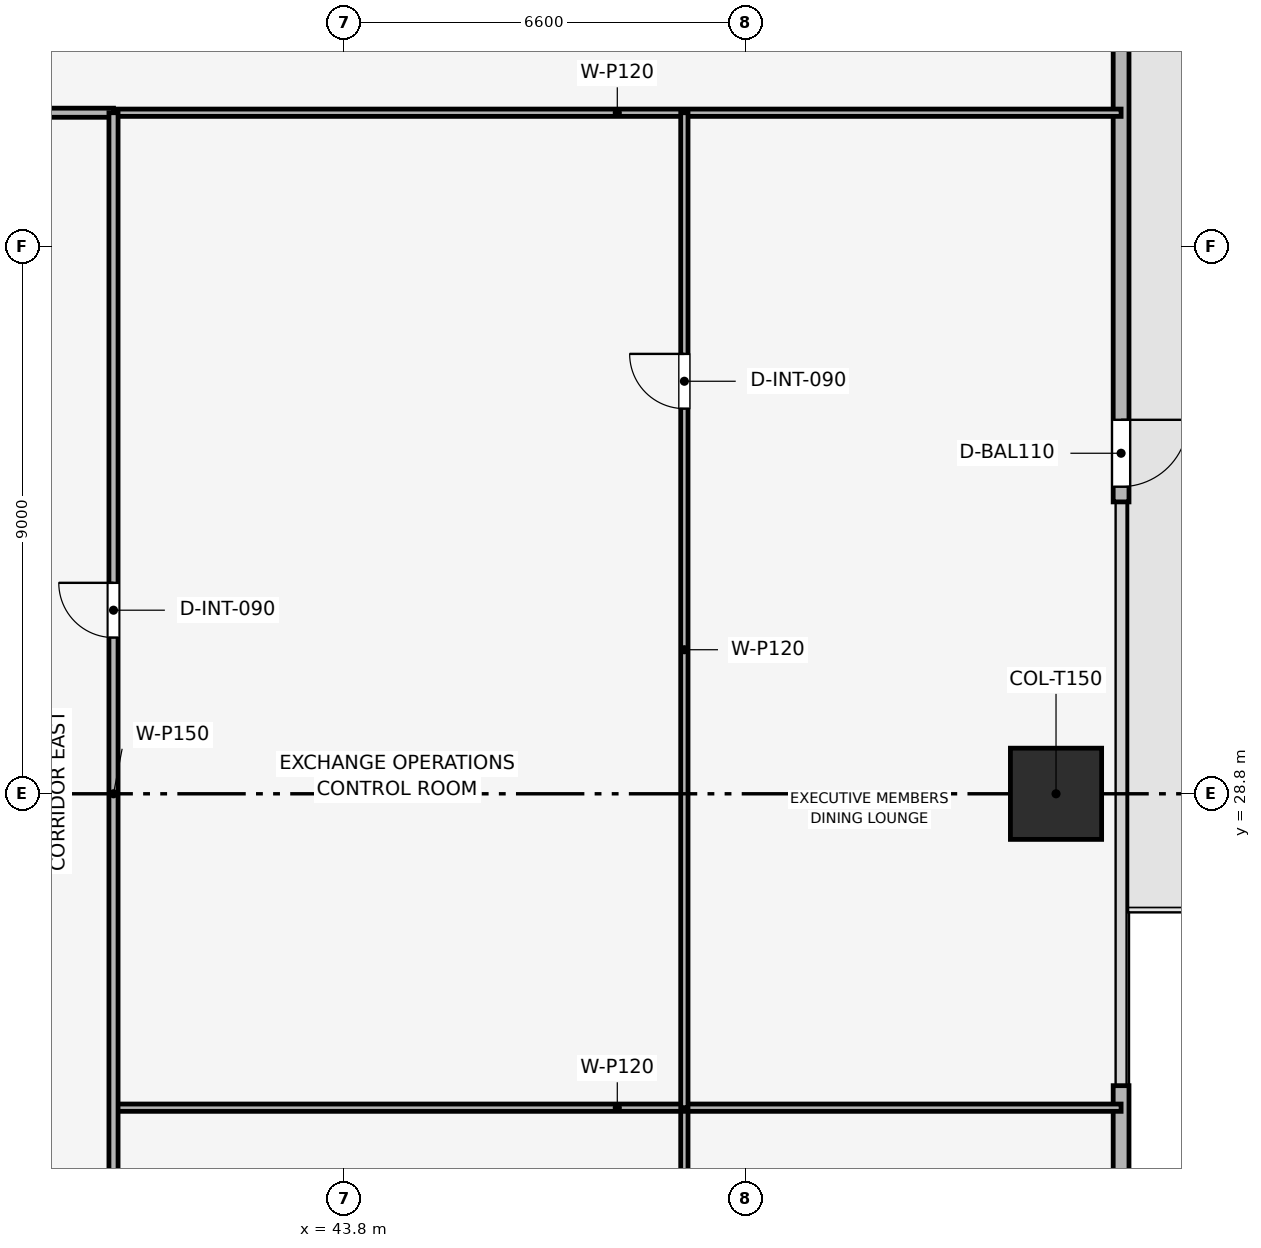
"""IFC4 building model, lengths in metres.
Left out: names, types, materials, properties, quantities, classifications, styles, units other than length and angle.
Written with IfcOpenShell. Run it as: python <this file> out.ifc"""

import sys

from ifc_helpers import new_model, si_unit, direction, frame, frame_2d, origin, origin_2d, place, context, subcontext, project, spatial, rectangle, extrude, element, fill, save


model = new_model("IFC4")
c1 = context("Model", 3, precision=1e-05, world=origin(), true_north=direction((0.0, 1.0)))
c2 = subcontext(c1, "Body", "Model", "MODEL_VIEW")
j1 = project(units=[si_unit("LENGTHUNIT", "METRE"), si_unit("PLANEANGLEUNIT", "RADIAN")], contexts=[c1])
p1 = place(None, origin())
s1 = spatial("IfcSite", under=j1, at=p1, CompositionType="ELEMENT")
p2 = place(p1, origin())
s2 = spatial("IfcBuilding", under=s1, at=p2, CompositionType="ELEMENT")
p3 = place(p2, frame((0.0, 0.0, 96.3)))
s3 = spatial("IfcBuildingStorey", under=s2, at=p3, CompositionType="ELEMENT", Elevation=96.3)
p4 = place(p3, frame((55.5, 28.8, 0.003), z_axis=(0.0, 0.0, 1.0), x_axis=(1.0, 0.0, 0.0)))
e1 = element("IfcColumn", 1, at=p4, inside=s3, PredefinedType="COLUMN", context=c2, shape_type="SweptSolid", body=[
    extrude(rectangle(XDim=1.5, YDim=1.5, at=origin_2d()), origin(), (0.0, 0.0, 1.0), 3.644),
])
p5 = place(p3, frame((56.57, 48.9, 0.0), z_axis=(0.0, 0.0, 1.0), x_axis=(0.0, -1.0, 0.0)))
e2 = element("IfcWall", 2, at=p5, inside=s3, PredefinedType="SOLIDWALL", context=c2, shape_type="SweptSolid", body=[
    extrude(rectangle(XDim=15.3, YDim=0.26, at=frame_2d((7.65, 0.0))), origin(), (0.0, 0.0, 1.0), 3.65),
])
p6 = place(p5, frame((13.95, 0.0, 0.0)))
e3 = element("IfcOpeningElement", 3, at=p6, cuts=e2, PredefinedType="OPENING", context=c2, shape_type="SweptSolid", body=[
    extrude(rectangle(XDim=1.1, YDim=2.2, at=frame_2d((0.55, 1.1))), frame((0.0, 0.14, 0.0), z_axis=(0.0, -1.0, 0.0), x_axis=(1.0, 0.0, 0.0)), (0.0, 0.0, 1.0), 0.28),
])
p7 = place(p3, frame((56.57, 24.0, 0.0), z_axis=(0.0, 0.0, 1.0), x_axis=(0.0, -1.0, 0.0)))
e4 = element("IfcWall", 4, at=p7, inside=s3, PredefinedType="SOLIDWALL", context=c2, shape_type="SweptSolid", body=[
    extrude(rectangle(XDim=15.3, YDim=0.26, at=frame_2d((7.65, 0.0))), origin(), (0.0, 0.0, 1.0), 3.65),
])
p8 = place(p7, frame((11.25, 0.0, 0.9)))
e5 = element("IfcOpeningElement", 5, at=p8, cuts=e4, PredefinedType="OPENING", context=c2, shape_type="SweptSolid", body=[
    extrude(rectangle(XDim=3.8, YDim=1.9, at=frame_2d((1.9, 0.95))), frame((0.0, 0.14, 0.0), z_axis=(0.0, -1.0, 0.0), x_axis=(1.0, 0.0, 0.0)), (0.0, 0.0, 1.0), 0.28),
])
p9 = place(p3, frame((40.0, 40.0, 0.0), z_axis=(0.0, 0.0, 1.0), x_axis=(1.0, 0.0, 0.0)))
e6 = element("IfcWall", 6, at=p9, inside=s3, PredefinedType="PARTITIONING", context=c2, shape_type="SweptSolid", body=[
    extrude(rectangle(XDim=16.57, YDim=0.12, at=frame_2d((8.285, 0.0))), origin(), (0.0, 0.0, 1.0), 2.935),
])
p10 = place(p3, frame((49.388, 17.6, 0.0), z_axis=(0.0, 0.0, 1.0), x_axis=(0.0, 1.0, 0.0)))
e7 = element("IfcWall", 7, at=p10, inside=s3, PredefinedType="PARTITIONING", context=c2, shape_type="SweptSolid", body=[
    extrude(rectangle(XDim=6.038, YDim=0.12, at=frame_2d((3.019, 0.0))), origin(), (0.0, 0.0, 1.0), 3.085),
])
p11 = place(p10, frame((3.753, 0.0, 0.0)))
e8 = element("IfcOpeningElement", 8, at=p11, cuts=e7, PredefinedType="OPENING", context=c2, shape_type="SweptSolid", body=[
    extrude(rectangle(XDim=0.9, YDim=2.1, at=frame_2d((0.45, 1.05))), frame((0.0, 0.07, 0.0), z_axis=(0.0, -1.0, 0.0), x_axis=(1.0, 0.0, 0.0)), (0.0, 0.0, 1.0), 0.14),
])
p12 = place(p3, frame((40.0, 23.638, 0.0), z_axis=(0.0, 0.0, 1.0), x_axis=(1.0, 0.0, 0.0)))
e9 = element("IfcWall", 9, at=p12, inside=s3, PredefinedType="PARTITIONING", context=c2, shape_type="SweptSolid", body=[
    extrude(rectangle(XDim=16.57, YDim=0.12, at=frame_2d((8.285, 0.0))), origin(), (0.0, 0.0, 1.0), 2.935),
])
p13 = place(p3, frame((49.388, 23.638, 0.0), z_axis=(0.0, 0.0, 1.0), x_axis=(0.0, 1.0, 0.0)))
e10 = element("IfcWall", 10, at=p13, inside=s3, PredefinedType="PARTITIONING", context=c2, shape_type="SweptSolid", body=[
    extrude(rectangle(XDim=16.362, YDim=0.12, at=frame_2d((8.181, 0.0))), origin(), (0.0, 0.0, 1.0), 3.085),
])
p14 = place(p13, frame((11.496, 0.0, 0.0)))
e11 = element("IfcOpeningElement", 11, at=p14, cuts=e10, PredefinedType="OPENING", context=c2, shape_type="SweptSolid", body=[
    extrude(rectangle(XDim=0.9, YDim=2.1, at=frame_2d((0.45, 1.05))), frame((0.0, 0.07, 0.0), z_axis=(0.0, -1.0, 0.0), x_axis=(1.0, 0.0, 0.0)), (0.0, 0.0, 1.0), 0.14),
])
p15 = place(p3, frame((17.6, 40.0, 0.0), z_axis=(0.0, 0.0, 1.0), x_axis=(1.0, 0.0, 0.0)))
e12 = element("IfcWall", 12, at=p15, inside=s3, PredefinedType="PARTITIONING", context=c2, shape_type="SweptSolid", body=[
    extrude(rectangle(XDim=22.4, YDim=0.15, at=frame_2d((11.2, 0.0))), origin(), (0.0, 0.0, 1.0), 3.085),
])
p16 = place(p15, frame((1.95, 0.0, 0.0)))
e13 = element("IfcOpeningElement", 13, at=p16, cuts=e12, PredefinedType="OPENING", context=c2, shape_type="SweptSolid", body=[
    extrude(rectangle(XDim=0.9, YDim=2.1, at=frame_2d((0.45, 1.05))), frame((0.0, 0.085, 0.0), z_axis=(0.0, -1.0, 0.0), x_axis=(1.0, 0.0, 0.0)), (0.0, 0.0, 1.0), 0.17),
])
p17 = place(p15, frame((5.75, 0.0, 0.0)))
e14 = element("IfcOpeningElement", 14, at=p17, cuts=e12, PredefinedType="OPENING", context=c2, shape_type="SweptSolid", body=[
    extrude(rectangle(XDim=0.9, YDim=2.1, at=frame_2d((0.45, 1.05))), frame((0.0, 0.085, 0.0), z_axis=(0.0, -1.0, 0.0), x_axis=(1.0, 0.0, 0.0)), (0.0, 0.0, 1.0), 0.17),
])
p18 = place(p15, frame((8.65, 0.0, 0.0)))
e15 = element("IfcOpeningElement", 15, at=p18, cuts=e12, PredefinedType="OPENING", context=c2, shape_type="SweptSolid", body=[
    extrude(rectangle(XDim=0.9, YDim=2.1, at=frame_2d((0.45, 1.05))), frame((0.0, 0.085, 0.0), z_axis=(0.0, -1.0, 0.0), x_axis=(1.0, 0.0, 0.0)), (0.0, 0.0, 1.0), 0.17),
])
p19 = place(p15, frame((11.4, 0.0, 0.0)))
e16 = element("IfcOpeningElement", 16, at=p19, cuts=e12, PredefinedType="OPENING", context=c2, shape_type="SweptSolid", body=[
    extrude(rectangle(XDim=0.95, YDim=2.1, at=frame_2d((0.475, 1.05))), frame((0.0, 0.085, 0.0), z_axis=(0.0, -1.0, 0.0), x_axis=(1.0, 0.0, 0.0)), (0.0, 0.0, 1.0), 0.17),
])
p20 = place(p15, frame((17.35, 0.0, 0.0)))
e17 = element("IfcOpeningElement", 17, at=p20, cuts=e12, PredefinedType="OPENING", context=c2, shape_type="SweptSolid", body=[
    extrude(rectangle(XDim=0.9, YDim=2.1, at=frame_2d((0.45, 1.05))), frame((0.0, 0.085, 0.0), z_axis=(0.0, -1.0, 0.0), x_axis=(1.0, 0.0, 0.0)), (0.0, 0.0, 1.0), 0.17),
])
p21 = place(p3, frame((40.0, 17.6, 0.0), z_axis=(0.0, 0.0, 1.0), x_axis=(0.0, 1.0, 0.0)))
e18 = element("IfcWall", 18, at=p21, inside=s3, PredefinedType="PARTITIONING", context=c2, shape_type="SweptSolid", body=[
    extrude(rectangle(XDim=22.4, YDim=0.15, at=frame_2d((11.2, 0.0))), origin(), (0.0, 0.0, 1.0), 3.085),
])
p22 = place(p21, frame((2.569, 0.0, 0.0)))
e19 = element("IfcOpeningElement", 19, at=p22, cuts=e18, PredefinedType="OPENING", context=c2, shape_type="SweptSolid", body=[
    extrude(rectangle(XDim=0.9, YDim=2.1, at=frame_2d((0.45, 1.05))), frame((0.0, 0.085, 0.0), z_axis=(0.0, -1.0, 0.0), x_axis=(1.0, 0.0, 0.0)), (0.0, 0.0, 1.0), 0.17),
])
p23 = place(p21, frame((13.769, 0.0, 0.0)))
e20 = element("IfcOpeningElement", 20, at=p23, cuts=e18, PredefinedType="OPENING", context=c2, shape_type="SweptSolid", body=[
    extrude(rectangle(XDim=0.9, YDim=2.1, at=frame_2d((0.45, 1.05))), frame((0.0, 0.085, 0.0), z_axis=(0.0, -1.0, 0.0), x_axis=(1.0, 0.0, 0.0)), (0.0, 0.0, 1.0), 0.17),
])
p24 = place(p6, origin())
e21 = element("IfcDoor", 21, at=p24, inside=s3, OperationType="SINGLE_SWING_LEFT", PredefinedType="DOOR", context=c2, shape_type="SweptSolid", body=[
    extrude(rectangle(XDim=1.1, YDim=2.2, at=frame_2d((0.55, 1.1))), frame((0.0, 0.025, 0.0), z_axis=(0.0, -1.0, 0.0), x_axis=(1.0, 0.0, 0.0)), (0.0, 0.0, 1.0), 0.05),
])
fill(e3, e21)
p25 = place(p14, origin())
e22 = element("IfcDoor", 22, at=p25, inside=s3, OperationType="SINGLE_SWING_RIGHT", PredefinedType="DOOR", context=c2, shape_type="SweptSolid", body=[
    extrude(rectangle(XDim=0.9, YDim=2.1, at=frame_2d((0.45, 1.05))), frame((0.0, 0.025, 0.0), z_axis=(0.0, -1.0, 0.0), x_axis=(1.0, 0.0, 0.0)), (0.0, 0.0, 1.0), 0.05),
])
fill(e11, e22)
p26 = place(p23, origin())
e23 = element("IfcDoor", 23, at=p26, inside=s3, OperationType="SINGLE_SWING_RIGHT", PredefinedType="DOOR", context=c2, shape_type="SweptSolid", body=[
    extrude(rectangle(XDim=0.9, YDim=2.1, at=frame_2d((0.45, 1.05))), frame((0.0, 0.025, 0.0), z_axis=(0.0, -1.0, 0.0), x_axis=(1.0, 0.0, 0.0)), (0.0, 0.0, 1.0), 0.05),
])
fill(e20, e23)
save(model, sys.argv[1])
